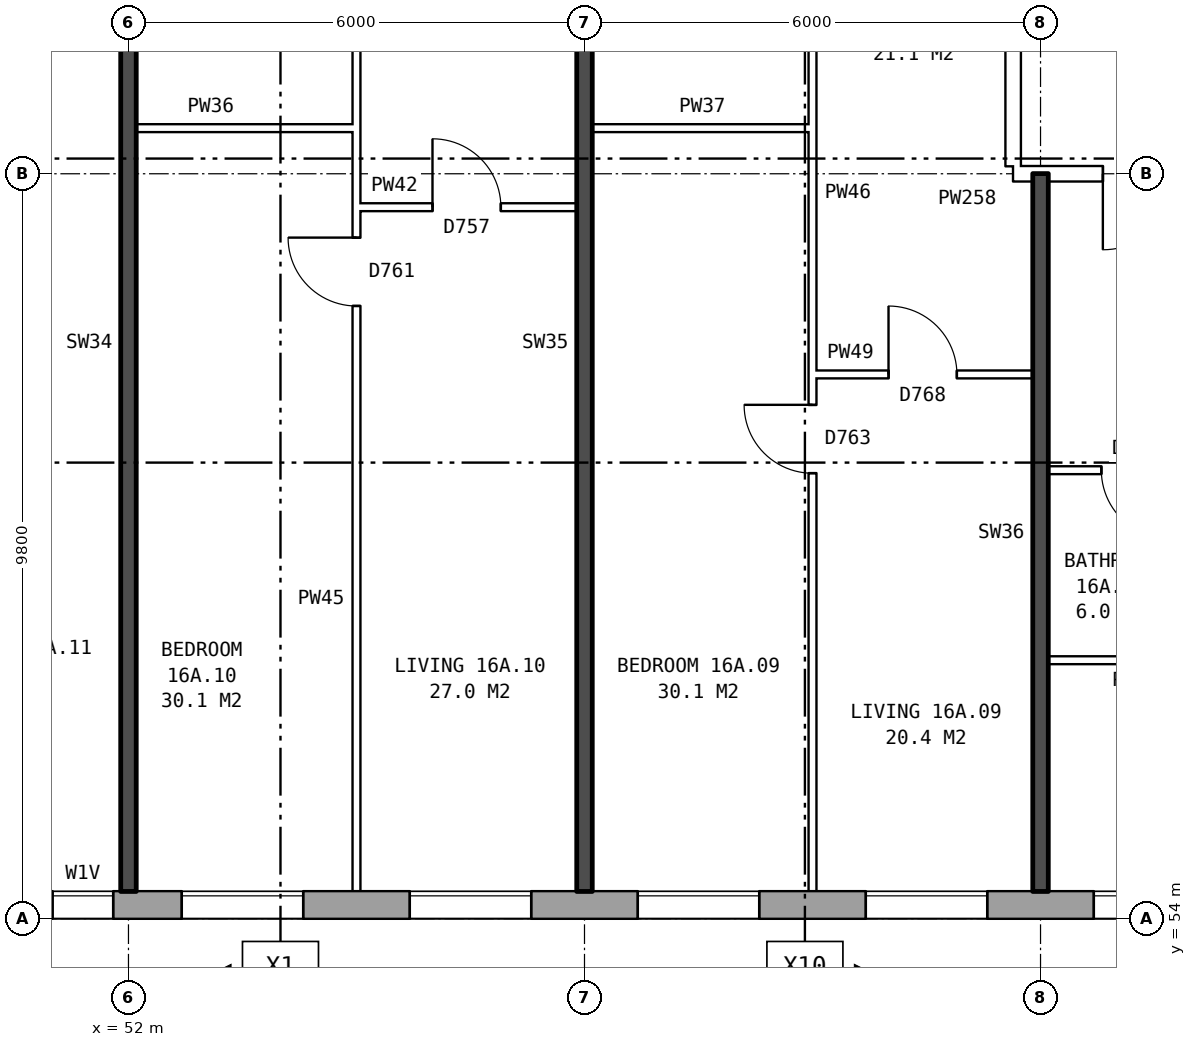
"""IFC4 building model, lengths in metres.
Left out: names, types, materials, properties, quantities, classifications, styles, units other than length and angle.
Written with IfcOpenShell. Run it as: python <this file> out.ifc"""

import sys

from ifc_helpers import new_model, si_unit, direction, frame, frame_2d, origin, place, context, subcontext, project, spatial, rectangle, extrude, element, fill, save


model = new_model("IFC4")
c1 = context("Model", 3, precision=1e-05, world=origin(), true_north=direction((0.0, 1.0)))
c2 = subcontext(c1, "Body", "Model", "MODEL_VIEW")
j1 = project(units=[si_unit("LENGTHUNIT", "METRE"), si_unit("PLANEANGLEUNIT", "RADIAN")], contexts=[c1])
p1 = place(None, origin())
s1 = spatial("IfcSite", under=j1, at=p1, CompositionType="ELEMENT")
p2 = place(p1, origin())
s2 = spatial("IfcBuilding", under=s1, at=p2, CompositionType="ELEMENT")
p3 = place(p2, frame((0.0, 0.0, 59.8)))
s3 = spatial("IfcBuildingStorey", under=s2, at=p3, CompositionType="ELEMENT", Elevation=59.8)
p4 = place(p3, frame((24.575, 54.18, 0.0), z_axis=(0.0, 0.0, 1.0), x_axis=(1.0, 0.0, 0.0)))
e1 = element("IfcWall", 1, at=p4, inside=s3, PredefinedType="STANDARD", context=c2, shape_type="SweptSolid", body=[
    extrude(rectangle(XDim=48.351, YDim=0.36, at=frame_2d((24.175, 0.0))), origin(), (0.0, 0.0, 1.0), 2.85),
])
p5 = place(p4, frame((1.125, 0.0, 0.8)))
e2 = element("IfcOpeningElement", 2, at=p5, cuts=e1, PredefinedType="OPENING", context=c2, shape_type="SweptSolid", body=[
    extrude(rectangle(XDim=1.6, YDim=1.8, at=frame_2d((0.8, 0.9))), frame((0.0, 0.19, 0.0), z_axis=(0.0, -1.0, 0.0), x_axis=(1.0, 0.0, 0.0)), (0.0, 0.0, 1.0), 0.38),
])
p6 = place(p4, frame((4.125, 0.0, 0.8)))
e3 = element("IfcOpeningElement", 3, at=p6, cuts=e1, PredefinedType="OPENING", context=c2, shape_type="SweptSolid", body=[
    extrude(rectangle(XDim=1.6, YDim=1.8, at=frame_2d((0.8, 0.9))), frame((0.0, 0.19, 0.0), z_axis=(0.0, -1.0, 0.0), x_axis=(1.0, 0.0, 0.0)), (0.0, 0.0, 1.0), 0.38),
])
p7 = place(p4, frame((7.125, 0.0, 0.8)))
e4 = element("IfcOpeningElement", 4, at=p7, cuts=e1, PredefinedType="OPENING", context=c2, shape_type="SweptSolid", body=[
    extrude(rectangle(XDim=1.6, YDim=1.8, at=frame_2d((0.8, 0.9))), frame((0.0, 0.19, 0.0), z_axis=(0.0, -1.0, 0.0), x_axis=(1.0, 0.0, 0.0)), (0.0, 0.0, 1.0), 0.38),
])
p8 = place(p4, frame((10.125, 0.0, 0.8)))
e5 = element("IfcOpeningElement", 5, at=p8, cuts=e1, PredefinedType="OPENING", context=c2, shape_type="SweptSolid", body=[
    extrude(rectangle(XDim=1.6, YDim=1.8, at=frame_2d((0.8, 0.9))), frame((0.0, 0.19, 0.0), z_axis=(0.0, -1.0, 0.0), x_axis=(1.0, 0.0, 0.0)), (0.0, 0.0, 1.0), 0.38),
])
p9 = place(p4, frame((13.125, 0.0, 0.8)))
e6 = element("IfcOpeningElement", 6, at=p9, cuts=e1, PredefinedType="OPENING", context=c2, shape_type="SweptSolid", body=[
    extrude(rectangle(XDim=1.6, YDim=1.8, at=frame_2d((0.8, 0.9))), frame((0.0, 0.19, 0.0), z_axis=(0.0, -1.0, 0.0), x_axis=(1.0, 0.0, 0.0)), (0.0, 0.0, 1.0), 0.38),
])
p10 = place(p4, frame((16.125, 0.0, 0.8)))
e7 = element("IfcOpeningElement", 7, at=p10, cuts=e1, PredefinedType="OPENING", context=c2, shape_type="SweptSolid", body=[
    extrude(rectangle(XDim=1.6, YDim=1.8, at=frame_2d((0.8, 0.9))), frame((0.0, 0.19, 0.0), z_axis=(0.0, -1.0, 0.0), x_axis=(1.0, 0.0, 0.0)), (0.0, 0.0, 1.0), 0.38),
])
p11 = place(p4, frame((19.125, 0.0, 0.8)))
e8 = element("IfcOpeningElement", 8, at=p11, cuts=e1, PredefinedType="OPENING", context=c2, shape_type="SweptSolid", body=[
    extrude(rectangle(XDim=1.6, YDim=1.8, at=frame_2d((0.8, 0.9))), frame((0.0, 0.19, 0.0), z_axis=(0.0, -1.0, 0.0), x_axis=(1.0, 0.0, 0.0)), (0.0, 0.0, 1.0), 0.38),
])
p12 = place(p4, frame((22.425, 0.0, 0.15)))
e9 = element("IfcOpeningElement", 9, at=p12, cuts=e1, PredefinedType="OPENING", context=c2, shape_type="SweptSolid", body=[
    extrude(rectangle(XDim=0.6, YDim=0.9, at=frame_2d((0.3, 0.45))), frame((0.0, 0.19, 0.0), z_axis=(0.0, -1.0, 0.0), x_axis=(1.0, 0.0, 0.0)), (0.0, 0.0, 1.0), 0.38),
])
p13 = place(p4, frame((24.575, 0.0, 0.25)))
e10 = element("IfcOpeningElement", 10, at=p13, cuts=e1, PredefinedType="OPENING", context=c2, shape_type="SweptSolid", body=[
    extrude(rectangle(XDim=1.2, YDim=0.9, at=frame_2d((0.6, 0.45))), frame((0.0, 0.19, 0.0), z_axis=(0.0, -1.0, 0.0), x_axis=(1.0, 0.0, 0.0)), (0.0, 0.0, 1.0), 0.38),
])
p14 = place(p4, frame((28.125, 0.0, 0.8)))
e11 = element("IfcOpeningElement", 11, at=p14, cuts=e1, PredefinedType="OPENING", context=c2, shape_type="SweptSolid", body=[
    extrude(rectangle(XDim=1.6, YDim=1.8, at=frame_2d((0.8, 0.9))), frame((0.0, 0.19, 0.0), z_axis=(0.0, -1.0, 0.0), x_axis=(1.0, 0.0, 0.0)), (0.0, 0.0, 1.0), 0.38),
])
p15 = place(p4, frame((31.125, 0.0, 0.8)))
e12 = element("IfcOpeningElement", 12, at=p15, cuts=e1, PredefinedType="OPENING", context=c2, shape_type="SweptSolid", body=[
    extrude(rectangle(XDim=1.6, YDim=1.8, at=frame_2d((0.8, 0.9))), frame((0.0, 0.19, 0.0), z_axis=(0.0, -1.0, 0.0), x_axis=(1.0, 0.0, 0.0)), (0.0, 0.0, 1.0), 0.38),
])
p16 = place(p4, frame((34.125, 0.0, 0.8)))
e13 = element("IfcOpeningElement", 13, at=p16, cuts=e1, PredefinedType="OPENING", context=c2, shape_type="SweptSolid", body=[
    extrude(rectangle(XDim=1.6, YDim=1.8, at=frame_2d((0.8, 0.9))), frame((0.0, 0.19, 0.0), z_axis=(0.0, -1.0, 0.0), x_axis=(1.0, 0.0, 0.0)), (0.0, 0.0, 1.0), 0.38),
])
p17 = place(p4, frame((37.125, 0.0, 0.8)))
e14 = element("IfcOpeningElement", 14, at=p17, cuts=e1, PredefinedType="OPENING", context=c2, shape_type="SweptSolid", body=[
    extrude(rectangle(XDim=1.6, YDim=1.8, at=frame_2d((0.8, 0.9))), frame((0.0, 0.19, 0.0), z_axis=(0.0, -1.0, 0.0), x_axis=(1.0, 0.0, 0.0)), (0.0, 0.0, 1.0), 0.38),
])
p18 = place(p4, frame((40.125, 0.0, 0.8)))
e15 = element("IfcOpeningElement", 15, at=p18, cuts=e1, PredefinedType="OPENING", context=c2, shape_type="SweptSolid", body=[
    extrude(rectangle(XDim=1.6, YDim=1.8, at=frame_2d((0.8, 0.9))), frame((0.0, 0.19, 0.0), z_axis=(0.0, -1.0, 0.0), x_axis=(1.0, 0.0, 0.0)), (0.0, 0.0, 1.0), 0.38),
])
p19 = place(p4, frame((43.125, 0.0, 0.8)))
e16 = element("IfcOpeningElement", 16, at=p19, cuts=e1, PredefinedType="OPENING", context=c2, shape_type="SweptSolid", body=[
    extrude(rectangle(XDim=1.6, YDim=1.8, at=frame_2d((0.8, 0.9))), frame((0.0, 0.19, 0.0), z_axis=(0.0, -1.0, 0.0), x_axis=(1.0, 0.0, 0.0)), (0.0, 0.0, 1.0), 0.38),
])
p20 = place(p4, frame((46.125, 0.0, 0.8)))
e17 = element("IfcOpeningElement", 17, at=p20, cuts=e1, PredefinedType="OPENING", context=c2, shape_type="SweptSolid", body=[
    extrude(rectangle(XDim=1.6, YDim=1.8, at=frame_2d((0.8, 0.9))), frame((0.0, 0.19, 0.0), z_axis=(0.0, -1.0, 0.0), x_axis=(1.0, 0.0, 0.0)), (0.0, 0.0, 1.0), 0.38),
])
p21 = place(p4, frame((23.325, 0.0, 0.15)))
e18 = element("IfcOpeningElement", 18, at=p21, cuts=e1, PredefinedType="OPENING", context=c2, shape_type="SweptSolid", body=[
    extrude(rectangle(XDim=0.8, YDim=1.5, at=frame_2d((0.4, 0.75))), frame((0.0, 0.19, 0.0), z_axis=(0.0, -1.0, 0.0), x_axis=(1.0, 0.0, 0.0)), (0.0, 0.0, 1.0), 0.38),
])
p22 = place(p4, frame((26.425, 0.0, 1.65)))
e19 = element("IfcOpeningElement", 19, at=p22, cuts=e1, PredefinedType="OPENING", context=c2, shape_type="SweptSolid", body=[
    extrude(rectangle(XDim=0.8, YDim=0.9, at=frame_2d((0.4, 0.45))), frame((0.0, 0.19, 0.0), z_axis=(0.0, -1.0, 0.0), x_axis=(1.0, 0.0, 0.0)), (0.0, 0.0, 1.0), 0.38),
])
p23 = place(p3, frame((63.64, 63.9, 0.0), z_axis=(0.0, 0.0, 1.0), x_axis=(0.0, 1.0, 0.0)))
e20 = element("IfcWall", 20, at=p23, inside=s3, PredefinedType="PARTITIONING", context=c2, shape_type="SweptSolid", body=[
    extrude(rectangle(XDim=12.2, YDim=0.2, at=frame_2d((6.1, 0.0))), origin(), (0.0, 0.0, 1.0), 2.85),
])
p24 = place(p23, frame((5.1, 0.0, 0.0)))
e21 = element("IfcOpeningElement", 21, at=p24, cuts=e20, PredefinedType="OPENING", context=c2, shape_type="SweptSolid", body=[
    extrude(rectangle(XDim=2.0, YDim=2.1, at=frame_2d((1.0, 1.05))), frame((0.0, 0.11, 0.0), z_axis=(0.0, -1.0, 0.0), x_axis=(1.0, 0.0, 0.0)), (0.0, 0.0, 1.0), 0.22),
])
p25 = place(p3, frame((64.1, 57.4, 0.0), z_axis=(0.0, 0.0, 1.0), x_axis=(1.0, 0.0, 0.0)))
e22 = element("IfcWall", 22, at=p25, inside=s3, PredefinedType="PARTITIONING", context=c2, shape_type="SweptSolid", body=[
    extrude(rectangle(XDim=2.3, YDim=0.1, at=frame_2d((1.15, 0.0))), origin(), (0.0, 0.0, 1.0), 2.85),
])
p26 = place(p3, frame((64.1, 59.9, 0.0), z_axis=(0.0, 0.0, 1.0), x_axis=(1.0, 0.0, 0.0)))
e23 = element("IfcWall", 23, at=p26, inside=s3, PredefinedType="PARTITIONING", context=c2, shape_type="SweptSolid", body=[
    extrude(rectangle(XDim=5.8, YDim=0.1, at=frame_2d((2.9, 0.0))), origin(), (0.0, 0.0, 1.0), 2.85),
])
p27 = place(p26, frame((3.6, 0.0, 0.0)))
e24 = element("IfcOpeningElement", 24, at=p27, cuts=e23, PredefinedType="OPENING", context=c2, shape_type="SweptSolid", body=[
    extrude(rectangle(XDim=0.9, YDim=2.1, at=frame_2d((0.45, 1.05))), frame((0.0, 0.06, 0.0), z_axis=(0.0, -1.0, 0.0), x_axis=(1.0, 0.0, 0.0)), (0.0, 0.0, 1.0), 0.12),
])
p28 = place(p26, frame((0.7, 0.0, 0.0)))
e25 = element("IfcOpeningElement", 25, at=p28, cuts=e23, PredefinedType="OPENING", context=c2, shape_type="SweptSolid", body=[
    extrude(rectangle(XDim=0.9, YDim=2.1, at=frame_2d((0.45, 1.05))), frame((0.0, 0.06, 0.0), z_axis=(0.0, -1.0, 0.0), x_axis=(1.0, 0.0, 0.0)), (0.0, 0.0, 1.0), 0.12),
])
p29 = place(p3, frame((61.0, 61.16, 0.0), z_axis=(0.0, 0.0, 1.0), x_axis=(1.0, 0.0, 0.0)))
e26 = element("IfcWall", 26, at=p29, inside=s3, PredefinedType="PARTITIONING", context=c2, shape_type="SweptSolid", body=[
    extrude(rectangle(XDim=2.9, YDim=0.1, at=frame_2d((1.45, 0.0))), origin(), (0.0, 0.0, 1.0), 2.85),
])
p30 = place(p29, frame((1.0, 0.0, 0.0)))
e27 = element("IfcOpeningElement", 27, at=p30, cuts=e26, PredefinedType="OPENING", context=c2, shape_type="SweptSolid", body=[
    extrude(rectangle(XDim=0.9, YDim=2.1, at=frame_2d((0.45, 1.05))), frame((0.0, 0.06, 0.0), z_axis=(0.0, -1.0, 0.0), x_axis=(1.0, 0.0, 0.0)), (0.0, 0.0, 1.0), 0.12),
])
p31 = place(p3, frame((55.0, 63.36, 0.0), z_axis=(0.0, 0.0, 1.0), x_axis=(1.0, 0.0, 0.0)))
e28 = element("IfcWall", 28, at=p31, inside=s3, PredefinedType="PARTITIONING", context=c2, shape_type="SweptSolid", body=[
    extrude(rectangle(XDim=2.9, YDim=0.1, at=frame_2d((1.45, 0.0))), origin(), (0.0, 0.0, 1.0), 2.85),
])
p32 = place(p31, frame((1.0, 0.0, 0.0)))
e29 = element("IfcOpeningElement", 29, at=p32, cuts=e28, PredefinedType="OPENING", context=c2, shape_type="SweptSolid", body=[
    extrude(rectangle(XDim=0.9, YDim=2.1, at=frame_2d((0.45, 1.05))), frame((0.0, 0.06, 0.0), z_axis=(0.0, -1.0, 0.0), x_axis=(1.0, 0.0, 0.0)), (0.0, 0.0, 1.0), 0.12),
])
p33 = place(p3, frame((63.64, 63.8, 0.0), z_axis=(0.0, 0.0, 1.0), x_axis=(1.0, 0.0, 0.0)))
e30 = element("IfcWall", 30, at=p33, inside=s3, PredefinedType="PARTITIONING", context=c2, shape_type="SweptSolid", body=[
    extrude(rectangle(XDim=3.0, YDim=0.2, at=frame_2d((1.5, 0.0))), origin(), (0.0, 0.0, 1.0), 2.85),
])
p34 = place(p33, frame((1.18, 0.0, 0.0)))
e31 = element("IfcOpeningElement", 31, at=p34, cuts=e30, PredefinedType="OPENING", context=c2, shape_type="SweptSolid", body=[
    extrude(rectangle(XDim=1.0, YDim=2.1, at=frame_2d((0.5, 1.05))), frame((0.0, 0.11, 0.0), z_axis=(0.0, -1.0, 0.0), x_axis=(1.0, 0.0, 0.0)), (0.0, 0.0, 1.0), 0.22),
])
for number, where, z_axis, x_axis in (
    (32, (52.1, 64.4, 0.0), (0.0, 0.0, 1.0), (1.0, 0.0, 0.0)),
    (33, (58.1, 64.4, 0.0), (0.0, 0.0, 1.0), (1.0, 0.0, 0.0)),
):
    element("IfcWall", number, at=place(p3, frame(where, z_axis=z_axis, x_axis=x_axis)), inside=s3, PredefinedType="PARTITIONING", context=c2, shape_type="SweptSolid", body=[
        extrude(rectangle(XDim=2.9, YDim=0.1, at=frame_2d((1.45, 0.0))), origin(), (0.0, 0.0, 1.0), 2.85),
    ])
p35 = place(p3, frame((52.0, 54.36, 0.0), z_axis=(0.0, 0.0, 1.0), x_axis=(0.0, 1.0, 0.0)))
e34 = element("IfcWall", 34, at=p35, inside=s3, PredefinedType="SOLIDWALL", context=c2, shape_type="SweptSolid", body=[
    extrude(rectangle(XDim=14.44, YDim=0.2, at=frame_2d((7.22, 0.0))), origin(), (0.0, 0.0, 1.0), 2.85),
])
p36 = place(p3, frame((55.0, 54.36, 0.0), z_axis=(0.0, 0.0, 1.0), x_axis=(0.0, 1.0, 0.0)))
e35 = element("IfcWall", 35, at=p36, inside=s3, PredefinedType="PARTITIONING", context=c2, shape_type="SweptSolid", body=[
    extrude(rectangle(XDim=14.34, YDim=0.1, at=frame_2d((7.17, 0.0))), origin(), (0.0, 0.0, 1.0), 2.85),
])
p37 = place(p36, frame((7.7, 0.0, 0.0)))
e36 = element("IfcOpeningElement", 36, at=p37, cuts=e35, PredefinedType="OPENING", context=c2, shape_type="SweptSolid", body=[
    extrude(rectangle(XDim=0.9, YDim=2.1, at=frame_2d((0.45, 1.05))), frame((0.0, 0.06, 0.0), z_axis=(0.0, -1.0, 0.0), x_axis=(1.0, 0.0, 0.0)), (0.0, 0.0, 1.0), 0.12),
])
p38 = place(p36, frame((13.04, 0.0, 0.0)))
e37 = element("IfcOpeningElement", 37, at=p38, cuts=e35, PredefinedType="OPENING", context=c2, shape_type="SweptSolid", body=[
    extrude(rectangle(XDim=0.9, YDim=2.1, at=frame_2d((0.45, 1.05))), frame((0.0, 0.06, 0.0), z_axis=(0.0, -1.0, 0.0), x_axis=(1.0, 0.0, 0.0)), (0.0, 0.0, 1.0), 0.12),
])
p39 = place(p3, frame((58.0, 54.36, 0.0), z_axis=(0.0, 0.0, 1.0), x_axis=(0.0, 1.0, 0.0)))
e38 = element("IfcWall", 38, at=p39, inside=s3, PredefinedType="SOLIDWALL", context=c2, shape_type="SweptSolid", body=[
    extrude(rectangle(XDim=14.44, YDim=0.2, at=frame_2d((7.22, 0.0))), origin(), (0.0, 0.0, 1.0), 2.85),
])
p40 = place(p3, frame((61.0, 54.36, 0.0), z_axis=(0.0, 0.0, 1.0), x_axis=(0.0, 1.0, 0.0)))
e39 = element("IfcWall", 39, at=p40, inside=s3, PredefinedType="PARTITIONING", context=c2, shape_type="SweptSolid", body=[
    extrude(rectangle(XDim=14.34, YDim=0.1, at=frame_2d((7.17, 0.0))), origin(), (0.0, 0.0, 1.0), 2.85),
])
p41 = place(p40, frame((5.5, 0.0, 0.0)))
e40 = element("IfcOpeningElement", 40, at=p41, cuts=e39, PredefinedType="OPENING", context=c2, shape_type="SweptSolid", body=[
    extrude(rectangle(XDim=0.9, YDim=2.1, at=frame_2d((0.45, 1.05))), frame((0.0, 0.06, 0.0), z_axis=(0.0, -1.0, 0.0), x_axis=(1.0, 0.0, 0.0)), (0.0, 0.0, 1.0), 0.12),
])
p42 = place(p40, frame((12.54, 0.0, 0.0)))
e41 = element("IfcOpeningElement", 41, at=p42, cuts=e39, PredefinedType="OPENING", context=c2, shape_type="SweptSolid", body=[
    extrude(rectangle(XDim=0.9, YDim=2.1, at=frame_2d((0.45, 1.05))), frame((0.0, 0.06, 0.0), z_axis=(0.0, -1.0, 0.0), x_axis=(1.0, 0.0, 0.0)), (0.0, 0.0, 1.0), 0.12),
])
p43 = place(p3, frame((64.0, 54.36, 0.0), z_axis=(0.0, 0.0, 1.0), x_axis=(0.0, 1.0, 0.0)))
e42 = element("IfcWall", 42, at=p43, inside=s3, PredefinedType="SOLIDWALL", context=c2, shape_type="SweptSolid", body=[
    extrude(rectangle(XDim=9.44, YDim=0.2, at=frame_2d((4.72, 0.0))), origin(), (0.0, 0.0, 1.0), 2.85),
])
p44 = place(p14, origin())
e43 = element("IfcWindow", 43, at=p44, inside=s3, PartitioningType="SINGLE_PANEL", PredefinedType="WINDOW", context=c2, shape_type="SweptSolid", body=[
    extrude(rectangle(XDim=1.6, YDim=1.8, at=frame_2d((0.8, 0.9))), frame((0.0, 0.15, 0.0), z_axis=(0.0, -1.0, 0.0), x_axis=(1.0, 0.0, 0.0)), (0.0, 0.0, 1.0), 0.06),
])
fill(e11, e43)
p45 = place(p15, origin())
e44 = element("IfcWindow", 44, at=p45, inside=s3, PartitioningType="SINGLE_PANEL", PredefinedType="WINDOW", context=c2, shape_type="SweptSolid", body=[
    extrude(rectangle(XDim=1.6, YDim=1.8, at=frame_2d((0.8, 0.9))), frame((0.0, 0.15, 0.0), z_axis=(0.0, -1.0, 0.0), x_axis=(1.0, 0.0, 0.0)), (0.0, 0.0, 1.0), 0.06),
])
fill(e12, e44)
p46 = place(p16, origin())
e45 = element("IfcWindow", 45, at=p46, inside=s3, PartitioningType="SINGLE_PANEL", PredefinedType="WINDOW", context=c2, shape_type="SweptSolid", body=[
    extrude(rectangle(XDim=1.6, YDim=1.8, at=frame_2d((0.8, 0.9))), frame((0.0, 0.15, 0.0), z_axis=(0.0, -1.0, 0.0), x_axis=(1.0, 0.0, 0.0)), (0.0, 0.0, 1.0), 0.06),
])
fill(e13, e45)
p47 = place(p17, origin())
e46 = element("IfcWindow", 46, at=p47, inside=s3, PartitioningType="SINGLE_PANEL", PredefinedType="WINDOW", context=c2, shape_type="SweptSolid", body=[
    extrude(rectangle(XDim=1.6, YDim=1.8, at=frame_2d((0.8, 0.9))), frame((0.0, 0.15, 0.0), z_axis=(0.0, -1.0, 0.0), x_axis=(1.0, 0.0, 0.0)), (0.0, 0.0, 1.0), 0.06),
])
fill(e14, e46)
p48 = place(p18, origin())
e47 = element("IfcWindow", 47, at=p48, inside=s3, PartitioningType="SINGLE_PANEL", PredefinedType="WINDOW", context=c2, shape_type="SweptSolid", body=[
    extrude(rectangle(XDim=1.6, YDim=1.8, at=frame_2d((0.8, 0.9))), frame((0.0, 0.15, 0.0), z_axis=(0.0, -1.0, 0.0), x_axis=(1.0, 0.0, 0.0)), (0.0, 0.0, 1.0), 0.06),
])
fill(e15, e47)
p49 = place(p34, frame((1.0, 0.0, 0.0), z_axis=(0.0, 0.0, 1.0), x_axis=(-1.0, 0.0, 0.0)))
e48 = element("IfcDoor", 48, at=p49, inside=s3, OperationType="SINGLE_SWING_RIGHT", PredefinedType="DOOR", context=c2, shape_type="SweptSolid", body=[
    extrude(rectangle(XDim=1.0, YDim=2.1, at=frame_2d((0.5, 1.05))), frame((0.0, 0.025, 0.0), z_axis=(0.0, -1.0, 0.0), x_axis=(1.0, 0.0, 0.0)), (0.0, 0.0, 1.0), 0.05),
])
fill(e31, e48)
p50 = place(p28, frame((0.9, 0.0, 0.0), z_axis=(0.0, 0.0, 1.0), x_axis=(-1.0, 0.0, 0.0)))
e49 = element("IfcDoor", 49, at=p50, inside=s3, OperationType="SINGLE_SWING_LEFT", PredefinedType="DOOR", context=c2, shape_type="SweptSolid", body=[
    extrude(rectangle(XDim=0.9, YDim=2.1, at=frame_2d((0.45, 1.05))), frame((0.0, 0.025, 0.0), z_axis=(0.0, -1.0, 0.0), x_axis=(1.0, 0.0, 0.0)), (0.0, 0.0, 1.0), 0.05),
])
fill(e25, e49)
p51 = place(p41, origin())
e50 = element("IfcDoor", 50, at=p51, inside=s3, OperationType="SINGLE_SWING_RIGHT", PredefinedType="DOOR", context=c2, shape_type="SweptSolid", body=[
    extrude(rectangle(XDim=0.9, YDim=2.1, at=frame_2d((0.45, 1.05))), frame((0.0, 0.025, 0.0), z_axis=(0.0, -1.0, 0.0), x_axis=(1.0, 0.0, 0.0)), (0.0, 0.0, 1.0), 0.05),
])
fill(e40, e50)
p52 = place(p30, origin())
e51 = element("IfcDoor", 51, at=p52, inside=s3, OperationType="SINGLE_SWING_LEFT", PredefinedType="DOOR", context=c2, shape_type="SweptSolid", body=[
    extrude(rectangle(XDim=0.9, YDim=2.1, at=frame_2d((0.45, 1.05))), frame((0.0, 0.025, 0.0), z_axis=(0.0, -1.0, 0.0), x_axis=(1.0, 0.0, 0.0)), (0.0, 0.0, 1.0), 0.05),
])
fill(e27, e51)
p53 = place(p37, origin())
e52 = element("IfcDoor", 52, at=p53, inside=s3, OperationType="SINGLE_SWING_RIGHT", PredefinedType="DOOR", context=c2, shape_type="SweptSolid", body=[
    extrude(rectangle(XDim=0.9, YDim=2.1, at=frame_2d((0.45, 1.05))), frame((0.0, 0.025, 0.0), z_axis=(0.0, -1.0, 0.0), x_axis=(1.0, 0.0, 0.0)), (0.0, 0.0, 1.0), 0.05),
])
fill(e36, e52)
p54 = place(p32, origin())
e53 = element("IfcDoor", 53, at=p54, inside=s3, OperationType="SINGLE_SWING_LEFT", PredefinedType="DOOR", context=c2, shape_type="SweptSolid", body=[
    extrude(rectangle(XDim=0.9, YDim=2.1, at=frame_2d((0.45, 1.05))), frame((0.0, 0.025, 0.0), z_axis=(0.0, -1.0, 0.0), x_axis=(1.0, 0.0, 0.0)), (0.0, 0.0, 1.0), 0.05),
])
fill(e29, e53)
p55 = place(p22, origin())
e54 = element("IfcWindow", 54, at=p55, inside=s3, PartitioningType="SINGLE_PANEL", PredefinedType="WINDOW", context=c2, shape_type="SweptSolid", body=[
    extrude(rectangle(XDim=0.8, YDim=0.9, at=frame_2d((0.4, 0.45))), frame((0.0, 0.15, 0.0), z_axis=(0.0, -1.0, 0.0), x_axis=(1.0, 0.0, 0.0)), (0.0, 0.0, 1.0), 0.06),
])
fill(e19, e54)
save(model, sys.argv[1])
